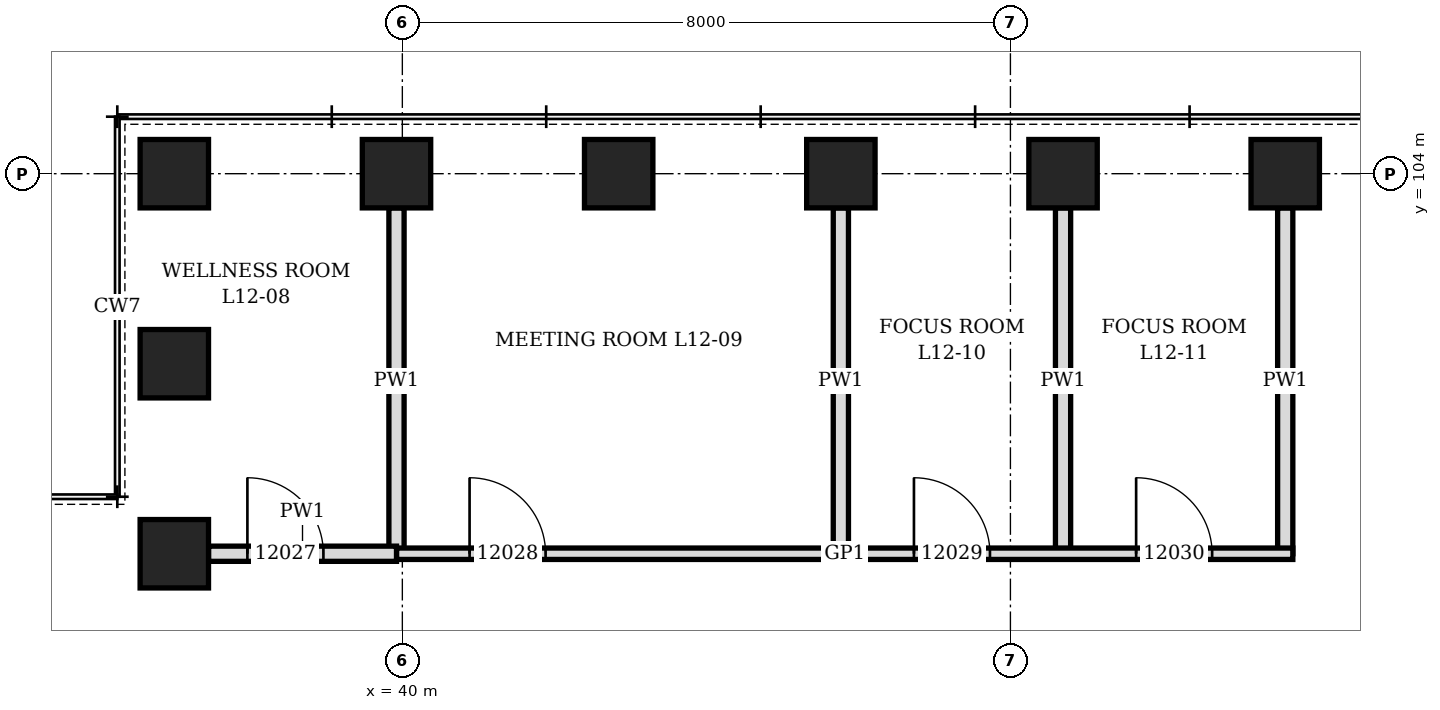
"""IFC4 building model, lengths in metres.
Left out: names, types, materials, properties, quantities, classifications, styles, units other than length and angle.
Written with IfcOpenShell. Run it as: python <this file> out.ifc"""

import sys

from ifc_helpers import new_model, si_unit, direction, frame, frame_2d, origin, origin_2d, place, context, subcontext, project, spatial, rectangle, hollow_rectangle, extrude, element, fill, save


model = new_model("IFC4")
c1 = context("Model", 3, precision=1e-05, world=origin(), true_north=direction((0.0, 1.0)))
c2 = subcontext(c1, "Body", "Model", "MODEL_VIEW")
j1 = project(units=[si_unit("LENGTHUNIT", "METRE"), si_unit("PLANEANGLEUNIT", "RADIAN")], contexts=[c1])
p1 = place(None, origin())
s1 = spatial("IfcSite", under=j1, at=p1, CompositionType="ELEMENT")
p2 = place(p1, origin())
s2 = spatial("IfcBuilding", under=s1, at=p2, CompositionType="ELEMENT")
p3 = place(p2, frame((0.0, 0.0, 60.1)))
s3 = spatial("IfcBuildingStorey", under=s2, at=p3, CompositionType="ELEMENT", Elevation=60.1)
for number, where, z_axis, x_axis in (
    (1, (51.615, 104.0, 0.0), (0.0, 0.0, 1.0), (1.0, 0.0, 0.0)),
    (2, (48.692, 104.0, 0.0), (0.0, 0.0, 1.0), (1.0, 0.0, 0.0)),
    (3, (45.769, 104.0, 0.0), (0.0, 0.0, 1.0), (1.0, 0.0, 0.0)),
    (4, (42.846, 104.0, 0.0), (0.0, 0.0, 1.0), (1.0, 0.0, 0.0)),
    (5, (39.923, 104.0, 0.0), (0.0, 0.0, 1.0), (1.0, 0.0, 0.0)),
    (6, (37.0, 104.0, 0.0), (0.0, 0.0, 1.0), (0.0, 1.0, 0.0)),
    (7, (37.0, 101.5, 0.0), (0.0, 0.0, 1.0), (0.0, 1.0, 0.0)),
    (8, (37.0, 99.0, 0.0), (0.0, 0.0, 1.0), (1.0, 0.0, 0.0)),
):
    element("IfcColumn", number, at=place(p3, frame(where, z_axis=z_axis, x_axis=x_axis)), inside=s3, PredefinedType="COLUMN", context=c2, shape_type="SweptSolid", body=[
        extrude(hollow_rectangle(XDim=0.9, YDim=0.9, WallThickness=0.12, at=origin_2d()), origin(), (0.0, 0.0, 1.0), 4.2),
    ])
p4 = place(p3, frame((39.923, 99.0, 0.0), z_axis=(0.0, 0.0, 1.0), x_axis=(0.0, 1.0, 0.0)))
e9 = element("IfcWall", 9, at=p4, inside=s3, PredefinedType="PARTITIONING", context=c2, shape_type="SweptSolid", body=[
    extrude(rectangle(XDim=4.55, YDim=0.2, at=frame_2d((2.275, 0.0))), origin(), (0.0, 0.0, 1.0), 3.428),
])
for number, where, z_axis, x_axis in (
    (10, (45.769, 99.0, 0.0), (0.0, 0.0, 1.0), (0.0, 1.0, 0.0)),
    (11, (48.692, 99.0, 0.0), (0.0, 0.0, 1.0), (0.0, 1.0, 0.0)),
    (12, (51.615, 99.0, 0.0), (0.0, 0.0, 1.0), (0.0, 1.0, 0.0)),
):
    element("IfcWall", number, at=place(p3, frame(where, z_axis=z_axis, x_axis=x_axis)), inside=s3, PredefinedType="PARTITIONING", context=c2, shape_type="SweptSolid", body=[
        extrude(rectangle(XDim=4.55, YDim=0.2, at=frame_2d((2.275, 0.0))), origin(), (0.0, 0.0, 1.0), 3.278),
    ])
p5 = place(p3, frame((39.923, 99.0, 0.0), z_axis=(0.0, 0.0, 1.0), x_axis=(1.0, 0.0, 0.0)))
e13 = element("IfcWall", 13, at=p5, inside=s3, PredefinedType="PARTITIONING", context=c2, shape_type="SweptSolid", body=[
    extrude(rectangle(XDim=11.792, YDim=0.15, at=frame_2d((5.896, 0.0))), origin(), (0.0, 0.0, 1.0), 4.04),
])
p6 = place(p5, frame((0.961, 0.0, 0.0)))
e14 = element("IfcOpeningElement", 14, at=p6, cuts=e13, PredefinedType="OPENING", context=c2, shape_type="SweptSolid", body=[
    extrude(rectangle(XDim=1.0, YDim=2.4, at=frame_2d((0.5, 1.2))), frame((0.0, 0.085, 0.0), z_axis=(0.0, -1.0, 0.0), x_axis=(1.0, 0.0, 0.0)), (0.0, 0.0, 1.0), 0.17),
])
p7 = place(p5, frame((6.808, 0.0, 0.0)))
e15 = element("IfcOpeningElement", 15, at=p7, cuts=e13, PredefinedType="OPENING", context=c2, shape_type="SweptSolid", body=[
    extrude(rectangle(XDim=1.0, YDim=2.4, at=frame_2d((0.5, 1.2))), frame((0.0, 0.085, 0.0), z_axis=(0.0, -1.0, 0.0), x_axis=(1.0, 0.0, 0.0)), (0.0, 0.0, 1.0), 0.17),
])
p8 = place(p5, frame((9.731, 0.0, 0.0)))
e16 = element("IfcOpeningElement", 16, at=p8, cuts=e13, PredefinedType="OPENING", context=c2, shape_type="SweptSolid", body=[
    extrude(rectangle(XDim=1.0, YDim=2.4, at=frame_2d((0.5, 1.2))), frame((0.0, 0.085, 0.0), z_axis=(0.0, -1.0, 0.0), x_axis=(1.0, 0.0, 0.0)), (0.0, 0.0, 1.0), 0.17),
])
p9 = place(p3, frame((37.45, 99.0, 0.0), z_axis=(0.0, 0.0, 1.0), x_axis=(1.0, 0.0, 0.0)))
e17 = element("IfcWall", 17, at=p9, inside=s3, PredefinedType="PARTITIONING", context=c2, shape_type="SweptSolid", body=[
    extrude(rectangle(XDim=2.473, YDim=0.2, at=frame_2d((1.237, 0.0))), origin(), (0.0, 0.0, 1.0), 4.04),
])
p10 = place(p9, frame((0.511, 0.0, 0.0)))
e18 = element("IfcOpeningElement", 18, at=p10, cuts=e17, PredefinedType="OPENING", context=c2, shape_type="SweptSolid", body=[
    extrude(rectangle(XDim=1.0, YDim=2.1, at=frame_2d((0.5, 1.05))), frame((0.0, 0.11, 0.0), z_axis=(0.0, -1.0, 0.0), x_axis=(1.0, 0.0, 0.0)), (0.0, 0.0, 1.0), 0.22),
])
p11 = place(p10, origin())
e19 = element("IfcDoor", 19, at=p11, inside=s3, OperationType="SINGLE_SWING_LEFT", PredefinedType="DOOR", context=c2, shape_type="SweptSolid", body=[
    extrude(rectangle(XDim=1.0, YDim=2.1, at=frame_2d((0.5, 1.05))), frame((0.0, 0.1, 0.0), z_axis=(0.0, -1.0, 0.0), x_axis=(1.0, 0.0, 0.0)), (0.0, 0.0, 1.0), 0.199),
])
fill(e18, e19)
p12 = place(p6, origin())
e20 = element("IfcDoor", 20, at=p12, inside=s3, OperationType="SINGLE_SWING_RIGHT", PredefinedType="DOOR", context=c2, shape_type="SweptSolid", body=[
    extrude(rectangle(XDim=1.0, YDim=2.4, at=frame_2d((0.5, 1.2))), frame((0.0, 0.075, 0.0), z_axis=(0.0, -1.0, 0.0), x_axis=(1.0, 0.0, 0.0)), (0.0, 0.0, 1.0), 0.149),
])
fill(e14, e20)
p13 = place(p7, origin())
e21 = element("IfcDoor", 21, at=p13, inside=s3, OperationType="SINGLE_SWING_RIGHT", PredefinedType="DOOR", context=c2, shape_type="SweptSolid", body=[
    extrude(rectangle(XDim=1.0, YDim=2.4, at=frame_2d((0.5, 1.2))), frame((0.0, 0.075, 0.0), z_axis=(0.0, -1.0, 0.0), x_axis=(1.0, 0.0, 0.0)), (0.0, 0.0, 1.0), 0.149),
])
fill(e15, e21)
p14 = place(p8, origin())
e22 = element("IfcDoor", 22, at=p14, inside=s3, OperationType="SINGLE_SWING_RIGHT", PredefinedType="DOOR", context=c2, shape_type="SweptSolid", body=[
    extrude(rectangle(XDim=1.0, YDim=2.4, at=frame_2d((0.5, 1.2))), frame((0.0, 0.075, 0.0), z_axis=(0.0, -1.0, 0.0), x_axis=(1.0, 0.0, 0.0)), (0.0, 0.0, 1.0), 0.149),
])
fill(e16, e22)
save(model, sys.argv[1])
